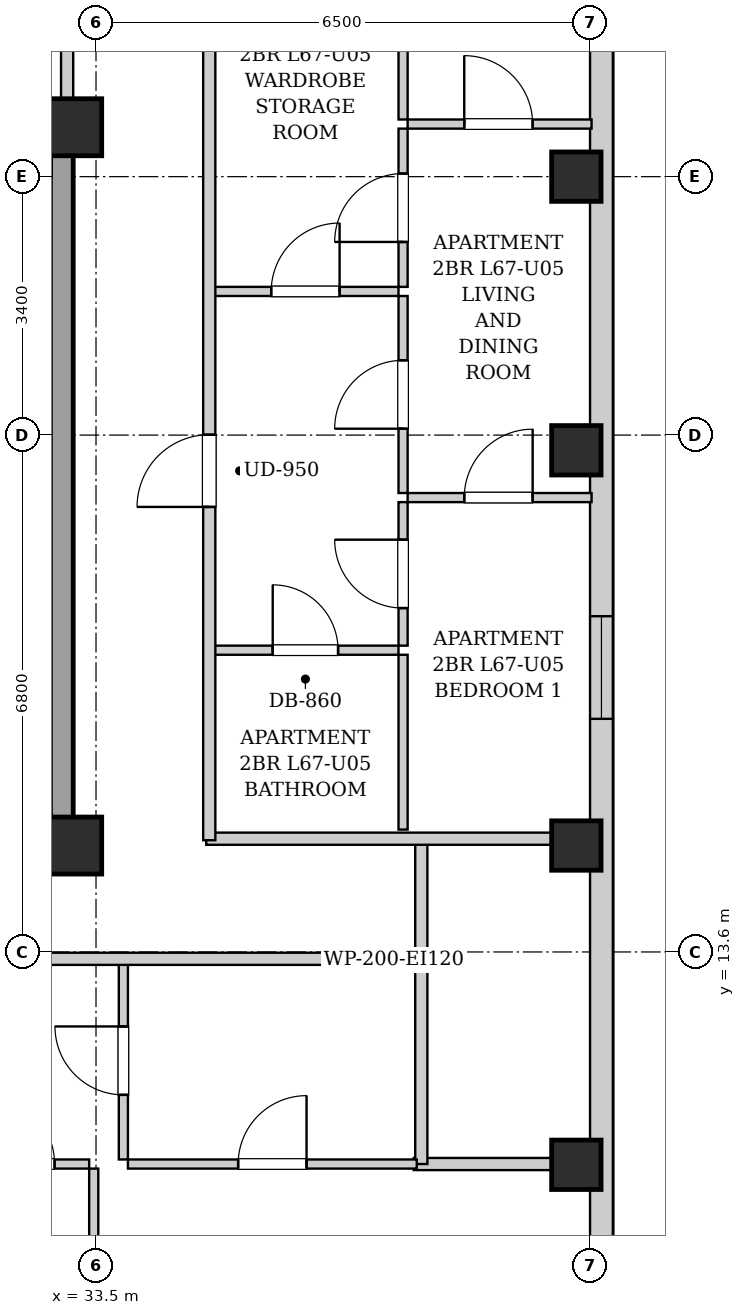
"""IFC4 building model, lengths in metres.
Left out: names, types, materials, properties, quantities, classifications, styles, units other than length and angle.
Written with IfcOpenShell. Run it as: python <this file> out.ifc"""

import sys

from ifc_helpers import new_model, si_unit, direction, frame, frame_2d, origin, origin_2d, place, context, subcontext, project, spatial, rectangle, extrude, element, fill, save


model = new_model("IFC4")
c1 = context("Model", 3, precision=1e-05, world=origin(), true_north=direction((0.0, 1.0)))
c2 = subcontext(c1, "Body", "Model", "MODEL_VIEW")
j1 = project(units=[si_unit("LENGTHUNIT", "METRE"), si_unit("PLANEANGLEUNIT", "RADIAN")], contexts=[c1])
p1 = place(None, origin())
s1 = spatial("IfcSite", under=j1, at=p1, CompositionType="ELEMENT")
p2 = place(p1, origin())
s2 = spatial("IfcBuilding", under=s1, at=p2, CompositionType="ELEMENT")
p3 = place(p2, frame((0.0, 0.0, 230.9)))
s3 = spatial("IfcBuildingStorey", under=s2, at=p3, CompositionType="ELEMENT", Elevation=230.9)
for number, where, z_axis, x_axis in (
    (1, (39.82, 10.8, 0.0), (0.0, 0.0, 1.0), (1.0, 0.0, 0.0)),
    (2, (39.82, 15.0, 0.0), (0.0, 0.0, 1.0), (1.0, 0.0, 0.0)),
    (3, (39.82, 20.2, 0.0), (0.0, 0.0, 1.0), (1.0, 0.0, 0.0)),
    (4, (39.82, 23.8, 0.0), (0.0, 0.0, 1.0), (1.0, 0.0, 0.0)),
):
    element("IfcColumn", number, at=place(p3, frame(where, z_axis=z_axis, x_axis=x_axis)), inside=s3, PredefinedType="COLUMN", context=c2, shape_type="SweptSolid", body=[
        extrude(rectangle(XDim=0.65, YDim=0.65, at=origin_2d()), origin(), (0.0, 0.0, 1.0), 3.4),
    ])
for number, where, z_axis, x_axis in (
    (5, (33.2, 15.0, 0.0), (0.0, 0.0, 1.0), (1.0, 0.0, 0.0)),
    (6, (33.2, 24.45, 0.0), (0.0, 0.0, 1.0), (1.0, 0.0, 0.0)),
):
    element("IfcColumn", number, at=place(p3, frame(where, z_axis=z_axis, x_axis=x_axis)), inside=s3, PredefinedType="COLUMN", context=c2, shape_type="SweptSolid", body=[
        extrude(rectangle(XDim=0.75, YDim=0.75, at=origin_2d()), origin(), (0.0, 0.0, 1.0), 3.4),
    ])
p4 = place(p3, frame((40.15, 37.7, 0.0), z_axis=(0.0, 0.0, 1.0), x_axis=(0.0, -1.0, 0.0)))
e7 = element("IfcWall", 7, at=p4, inside=s3, PredefinedType="SOLIDWALL", context=c2, shape_type="SweptSolid", body=[
    extrude(rectangle(XDim=31.4, YDim=0.3, at=frame_2d((15.7, 0.0))), origin(), (0.0, 0.0, 1.0), 3.14),
])
p5 = place(p4, frame((28.396, 0.0, 0.55)))
e8 = element("IfcOpeningElement", 8, at=p5, cuts=e7, PredefinedType="OPENING", context=c2, shape_type="SweptSolid", body=[
    extrude(rectangle(XDim=1.35, YDim=1.2, at=frame_2d((0.675, 0.6))), frame((0.0, 0.16, 0.0), z_axis=(0.0, -1.0, 0.0), x_axis=(1.0, 0.0, 0.0)), (0.0, 0.0, 1.0), 0.32),
])
p6 = place(p4, frame((1.653, 0.0, 0.55)))
e9 = element("IfcOpeningElement", 9, at=p6, cuts=e7, PredefinedType="OPENING", context=c2, shape_type="SweptSolid", body=[
    extrude(rectangle(XDim=1.35, YDim=1.2, at=frame_2d((0.675, 0.6))), frame((0.0, 0.16, 0.0), z_axis=(0.0, -1.0, 0.0), x_axis=(1.0, 0.0, 0.0)), (0.0, 0.0, 1.0), 0.32),
])
p7 = place(p4, frame((19.683, 0.0, 0.55)))
e10 = element("IfcOpeningElement", 10, at=p7, cuts=e7, PredefinedType="OPENING", context=c2, shape_type="SweptSolid", body=[
    extrude(rectangle(XDim=1.35, YDim=1.2, at=frame_2d((0.675, 0.6))), frame((0.0, 0.16, 0.0), z_axis=(0.0, -1.0, 0.0), x_axis=(1.0, 0.0, 0.0)), (0.0, 0.0, 1.0), 0.32),
])
p8 = place(p4, frame((10.367, 0.0, 0.55)))
e11 = element("IfcOpeningElement", 11, at=p8, cuts=e7, PredefinedType="OPENING", context=c2, shape_type="SweptSolid", body=[
    extrude(rectangle(XDim=1.35, YDim=1.2, at=frame_2d((0.675, 0.6))), frame((0.0, 0.16, 0.0), z_axis=(0.0, -1.0, 0.0), x_axis=(1.0, 0.0, 0.0)), (0.0, 0.0, 1.0), 0.32),
])
p9 = place(p3, frame((33.05, 15.1, 0.0), z_axis=(0.0, 0.0, 1.0), x_axis=(0.0, 1.0, 0.0)))
e12 = element("IfcWall", 12, at=p9, inside=s3, PredefinedType="SHEAR", context=c2, shape_type="SweptSolid", body=[
    extrude(rectangle(XDim=9.0, YDim=0.3, at=frame_2d((4.5, 0.0))), origin(), (0.0, 0.0, 1.0), 3.14),
])
p10 = place(p3, frame((33.12, 24.12, 0.0), z_axis=(0.0, 0.0, 1.0), x_axis=(0.0, 1.0, 0.0)))
e13 = element("IfcWall", 13, at=p10, inside=s3, PredefinedType="PARTITIONING", context=c2, shape_type="SweptSolid", body=[
    extrude(rectangle(XDim=4.76, YDim=0.16, at=frame_2d((2.38, 0.0))), origin(), (0.0, 0.0, 1.0), 3.14),
])
p11 = place(p3, frame((37.78, 13.51, 0.0), z_axis=(0.0, 0.0, 1.0), x_axis=(0.0, 1.0, 0.0)))
e14 = element("IfcWall", 14, at=p11, inside=s3, PredefinedType="PARTITIONING", context=c2, shape_type="SweptSolid", body=[
    extrude(rectangle(XDim=1.58, YDim=0.16, at=frame_2d((0.79, 0.0))), origin(), (0.0, 0.0, 1.0), 3.14),
])
p12 = place(p3, frame((34.95, 15.09, 0.0), z_axis=(0.0, 0.0, 1.0), x_axis=(1.0, 0.0, 0.0)))
e15 = element("IfcWall", 15, at=p12, inside=s3, PredefinedType="PARTITIONING", context=c2, shape_type="SweptSolid", body=[
    extrude(rectangle(XDim=5.07, YDim=0.16, at=frame_2d((2.535, 0.0))), origin(), (0.0, 0.0, 1.0), 2.668),
])
p13 = place(p3, frame((37.68, 10.81, 0.0), z_axis=(0.0, 0.0, 1.0), x_axis=(1.0, 0.0, 0.0)))
e16 = element("IfcWall", 16, at=p13, inside=s3, PredefinedType="PARTITIONING", context=c2, shape_type="SweptSolid", body=[
    extrude(rectangle(XDim=2.34, YDim=0.16, at=frame_2d((1.17, 0.0))), origin(), (0.0, 0.0, 1.0), 3.14),
])
p14 = place(p3, frame((37.78, 10.81, 0.0), z_axis=(0.0, 0.0, 1.0), x_axis=(0.0, 1.0, 0.0)))
e17 = element("IfcWall", 17, at=p14, inside=s3, PredefinedType="PARTITIONING", context=c2, shape_type="SweptSolid", body=[
    extrude(rectangle(XDim=2.66, YDim=0.16, at=frame_2d((1.33, 0.0))), origin(), (0.0, 0.0, 1.0), 3.14),
])
p15 = place(p3, frame((33.86, 10.87, 0.0), z_axis=(0.0, 0.0, 1.0), x_axis=(0.0, 1.0, 0.0)))
e18 = element("IfcWall", 18, at=p15, inside=s3, PredefinedType="PARTITIONING", context=c2, shape_type="SweptSolid", body=[
    extrude(rectangle(XDim=2.6, YDim=0.12, at=frame_2d((1.3, 0.0))), origin(), (0.0, 0.0, 1.0), 3.14),
])
p16 = place(p15, frame((0.85, 0.0, 0.0)))
e19 = element("IfcOpeningElement", 19, at=p16, cuts=e18, PredefinedType="OPENING", context=c2, shape_type="SweptSolid", body=[
    extrude(rectangle(XDim=0.9, YDim=2.05, at=frame_2d((0.45, 1.025))), frame((0.0, 0.07, 0.0), z_axis=(0.0, -1.0, 0.0), x_axis=(1.0, 0.0, 0.0)), (0.0, 0.0, 1.0), 0.14),
])
p17 = place(p3, frame((31.6, 10.81, 0.0), z_axis=(0.0, 0.0, 1.0), x_axis=(1.0, 0.0, 0.0)))
e20 = element("IfcWall", 20, at=p17, inside=s3, PredefinedType="PARTITIONING", context=c2, shape_type="SweptSolid", body=[
    extrude(rectangle(XDim=1.81, YDim=0.12, at=frame_2d((0.905, 0.0))), origin(), (0.0, 0.0, 1.0), 3.14),
])
p18 = place(p17, frame((0.455, 0.0, 0.0)))
e21 = element("IfcOpeningElement", 21, at=p18, cuts=e20, PredefinedType="OPENING", context=c2, shape_type="SweptSolid", body=[
    extrude(rectangle(XDim=0.9, YDim=2.05, at=frame_2d((0.45, 1.025))), frame((0.0, 0.07, 0.0), z_axis=(0.0, -1.0, 0.0), x_axis=(1.0, 0.0, 0.0)), (0.0, 0.0, 1.0), 0.14),
])
p19 = place(p3, frame((33.92, 10.81, 0.0), z_axis=(0.0, 0.0, 1.0), x_axis=(1.0, 0.0, 0.0)))
e22 = element("IfcWall", 22, at=p19, inside=s3, PredefinedType="PARTITIONING", context=c2, shape_type="SweptSolid", body=[
    extrude(rectangle(XDim=3.8, YDim=0.12, at=frame_2d((1.9, 0.0))), origin(), (0.0, 0.0, 1.0), 3.14),
])
p20 = place(p19, frame((1.45, 0.0, 0.0)))
e23 = element("IfcOpeningElement", 23, at=p20, cuts=e22, PredefinedType="OPENING", context=c2, shape_type="SweptSolid", body=[
    extrude(rectangle(XDim=0.9, YDim=2.05, at=frame_2d((0.45, 1.025))), frame((0.0, 0.07, 0.0), z_axis=(0.0, -1.0, 0.0), x_axis=(1.0, 0.0, 0.0)), (0.0, 0.0, 1.0), 0.14),
])
p21 = place(p3, frame((33.47, 6.23, 0.0), z_axis=(0.0, 0.0, 1.0), x_axis=(0.0, 1.0, 0.0)))
e24 = element("IfcWall", 24, at=p21, inside=s3, PredefinedType="PARTITIONING", context=c2, shape_type="SweptSolid", body=[
    extrude(rectangle(XDim=4.52, YDim=0.12, at=frame_2d((2.26, 0.0))), origin(), (0.0, 0.0, 1.0), 3.14),
])
p22 = place(p21, frame((1.81, 0.0, 0.0)))
e25 = element("IfcOpeningElement", 25, at=p22, cuts=e24, PredefinedType="OPENING", context=c2, shape_type="SweptSolid", body=[
    extrude(rectangle(XDim=0.9, YDim=2.05, at=frame_2d((0.45, 1.025))), frame((0.0, 0.07, 0.0), z_axis=(0.0, -1.0, 0.0), x_axis=(1.0, 0.0, 0.0)), (0.0, 0.0, 1.0), 0.14),
])
p23 = place(p3, frame((35.03, 22.29, 0.0), z_axis=(0.0, 0.0, 1.0), x_axis=(1.0, 0.0, 0.0)))
e26 = element("IfcWall", 26, at=p23, inside=s3, PredefinedType="PARTITIONING", context=c2, shape_type="SweptSolid", body=[
    extrude(rectangle(XDim=2.45, YDim=0.12, at=frame_2d((1.225, 0.0))), origin(), (0.0, 0.0, 1.0), 3.14),
])
p24 = place(p23, frame((0.775, 0.0, 0.0)))
e27 = element("IfcOpeningElement", 27, at=p24, cuts=e26, PredefinedType="OPENING", context=c2, shape_type="SweptSolid", body=[
    extrude(rectangle(XDim=0.9, YDim=2.05, at=frame_2d((0.45, 1.025))), frame((0.0, 0.07, 0.0), z_axis=(0.0, -1.0, 0.0), x_axis=(1.0, 0.0, 0.0)), (0.0, 0.0, 1.0), 0.14),
])
p25 = place(p3, frame((37.54, 22.35, 0.0), z_axis=(0.0, 0.0, 1.0), x_axis=(0.0, 1.0, 0.0)))
e28 = element("IfcWall", 28, at=p25, inside=s3, PredefinedType="PARTITIONING", context=c2, shape_type="SweptSolid", body=[
    extrude(rectangle(XDim=2.082, YDim=0.12, at=frame_2d((1.041, 0.0))), origin(), (0.0, 0.0, 1.0), 3.14),
])
p26 = place(p25, frame((0.591, 0.0, 0.0)))
e29 = element("IfcOpeningElement", 29, at=p26, cuts=e28, PredefinedType="OPENING", context=c2, shape_type="SweptSolid", body=[
    extrude(rectangle(XDim=0.9, YDim=2.05, at=frame_2d((0.45, 1.025))), frame((0.0, 0.07, 0.0), z_axis=(0.0, -1.0, 0.0), x_axis=(1.0, 0.0, 0.0)), (0.0, 0.0, 1.0), 0.14),
])
p27 = place(p3, frame((37.54, 24.552, 0.0), z_axis=(0.0, 0.0, 1.0), x_axis=(0.0, 1.0, 0.0)))
e30 = element("IfcWall", 30, at=p27, inside=s3, PredefinedType="PARTITIONING", context=c2, shape_type="SweptSolid", body=[
    extrude(rectangle(XDim=4.308, YDim=0.12, at=frame_2d((2.154, 0.0))), origin(), (0.0, 0.0, 1.0), 3.14),
])
p28 = place(p27, frame((1.704, 0.0, 0.0)))
e31 = element("IfcOpeningElement", 31, at=p28, cuts=e30, PredefinedType="OPENING", context=c2, shape_type="SweptSolid", body=[
    extrude(rectangle(XDim=0.9, YDim=2.05, at=frame_2d((0.45, 1.025))), frame((0.0, 0.07, 0.0), z_axis=(0.0, -1.0, 0.0), x_axis=(1.0, 0.0, 0.0)), (0.0, 0.0, 1.0), 0.14),
])
p29 = place(p3, frame((35.03, 17.57, 0.0), z_axis=(0.0, 0.0, 1.0), x_axis=(1.0, 0.0, 0.0)))
e32 = element("IfcWall", 32, at=p29, inside=s3, PredefinedType="PARTITIONING", context=c2, shape_type="SweptSolid", body=[
    extrude(rectangle(XDim=2.45, YDim=0.12, at=frame_2d((1.225, 0.0))), origin(), (0.0, 0.0, 1.0), 3.14),
])
p30 = place(p29, frame((0.795, 0.0, 0.0)))
e33 = element("IfcOpeningElement", 33, at=p30, cuts=e32, PredefinedType="OPENING", context=c2, shape_type="SweptSolid", body=[
    extrude(rectangle(XDim=0.86, YDim=2.05, at=frame_2d((0.43, 1.025))), frame((0.0, 0.07, 0.0), z_axis=(0.0, -1.0, 0.0), x_axis=(1.0, 0.0, 0.0)), (0.0, 0.0, 1.0), 0.14),
])
p31 = place(p3, frame((37.54, 15.21, 0.0), z_axis=(0.0, 0.0, 1.0), x_axis=(0.0, 1.0, 0.0)))
e34 = element("IfcWall", 34, at=p31, inside=s3, PredefinedType="PARTITIONING", context=c2, shape_type="SweptSolid", body=[
    extrude(rectangle(XDim=2.3, YDim=0.12, at=frame_2d((1.15, 0.0))), origin(), (0.0, 0.0, 1.0), 3.14),
])
p32 = place(p3, frame((37.54, 17.63, 0.0), z_axis=(0.0, 0.0, 1.0), x_axis=(0.0, 1.0, 0.0)))
e35 = element("IfcWall", 35, at=p32, inside=s3, PredefinedType="PARTITIONING", context=c2, shape_type="SweptSolid", body=[
    extrude(rectangle(XDim=1.888, YDim=0.12, at=frame_2d((0.944, 0.0))), origin(), (0.0, 0.0, 1.0), 3.14),
])
p33 = place(p32, frame((0.494, 0.0, 0.0)))
e36 = element("IfcOpeningElement", 36, at=p33, cuts=e35, PredefinedType="OPENING", context=c2, shape_type="SweptSolid", body=[
    extrude(rectangle(XDim=0.9, YDim=2.05, at=frame_2d((0.45, 1.025))), frame((0.0, 0.07, 0.0), z_axis=(0.0, -1.0, 0.0), x_axis=(1.0, 0.0, 0.0)), (0.0, 0.0, 1.0), 0.14),
])
p34 = place(p3, frame((37.54, 19.638, 0.0), z_axis=(0.0, 0.0, 1.0), x_axis=(0.0, 1.0, 0.0)))
e37 = element("IfcWall", 37, at=p34, inside=s3, PredefinedType="PARTITIONING", context=c2, shape_type="SweptSolid", body=[
    extrude(rectangle(XDim=2.592, YDim=0.12, at=frame_2d((1.296, 0.0))), origin(), (0.0, 0.0, 1.0), 3.14),
])
p35 = place(p34, frame((0.846, 0.0, 0.0)))
e38 = element("IfcOpeningElement", 38, at=p35, cuts=e37, PredefinedType="OPENING", context=c2, shape_type="SweptSolid", body=[
    extrude(rectangle(XDim=0.9, YDim=2.05, at=frame_2d((0.45, 1.025))), frame((0.0, 0.07, 0.0), z_axis=(0.0, -1.0, 0.0), x_axis=(1.0, 0.0, 0.0)), (0.0, 0.0, 1.0), 0.14),
])
p36 = place(p3, frame((37.6, 19.578, 0.0), z_axis=(0.0, 0.0, 1.0), x_axis=(1.0, 0.0, 0.0)))
e39 = element("IfcWall", 39, at=p36, inside=s3, PredefinedType="PARTITIONING", context=c2, shape_type="SweptSolid", body=[
    extrude(rectangle(XDim=2.42, YDim=0.12, at=frame_2d((1.21, 0.0))), origin(), (0.0, 0.0, 1.0), 3.14),
])
p37 = place(p36, frame((0.745, 0.0, 0.0)))
e40 = element("IfcOpeningElement", 40, at=p37, cuts=e39, PredefinedType="OPENING", context=c2, shape_type="SweptSolid", body=[
    extrude(rectangle(XDim=0.9, YDim=2.05, at=frame_2d((0.45, 1.025))), frame((0.0, 0.07, 0.0), z_axis=(0.0, -1.0, 0.0), x_axis=(1.0, 0.0, 0.0)), (0.0, 0.0, 1.0), 0.14),
])
p38 = place(p3, frame((37.6, 24.492, 0.0), z_axis=(0.0, 0.0, 1.0), x_axis=(1.0, 0.0, 0.0)))
e41 = element("IfcWall", 41, at=p38, inside=s3, PredefinedType="PARTITIONING", context=c2, shape_type="SweptSolid", body=[
    extrude(rectangle(XDim=2.42, YDim=0.12, at=frame_2d((1.21, 0.0))), origin(), (0.0, 0.0, 1.0), 2.878),
])
p39 = place(p38, frame((0.745, 0.0, 0.0)))
e42 = element("IfcOpeningElement", 42, at=p39, cuts=e41, PredefinedType="OPENING", context=c2, shape_type="SweptSolid", body=[
    extrude(rectangle(XDim=0.9, YDim=2.05, at=frame_2d((0.45, 1.025))), frame((0.0, 0.07, 0.0), z_axis=(0.0, -1.0, 0.0), x_axis=(1.0, 0.0, 0.0)), (0.0, 0.0, 1.0), 0.14),
])
p40 = place(p3, frame((13.15, 13.51, 0.0), z_axis=(0.0, 0.0, 1.0), x_axis=(1.0, 0.0, 0.0)))
e43 = element("IfcWall", 43, at=p40, inside=s3, PredefinedType="PARTITIONING", context=c2, shape_type="SweptSolid", body=[
    extrude(rectangle(XDim=24.6, YDim=0.16, at=frame_2d((12.3, 0.0))), origin(), (0.0, 0.0, 1.0), 3.14),
])
p41 = place(p40, frame((3.165, 0.0, 0.0)))
e44 = element("IfcOpeningElement", 44, at=p41, cuts=e43, PredefinedType="OPENING", context=c2, shape_type="SweptSolid", body=[
    extrude(rectangle(XDim=0.95, YDim=2.1, at=frame_2d((0.475, 1.05))), frame((0.0, 0.09, 0.0), z_axis=(0.0, -1.0, 0.0), x_axis=(1.0, 0.0, 0.0)), (0.0, 0.0, 1.0), 0.18),
])
p42 = place(p3, frame((34.99, 15.07, 0.0), z_axis=(0.0, 0.0, 1.0), x_axis=(0.0, 1.0, 0.0)))
e45 = element("IfcWall", 45, at=p42, inside=s3, PredefinedType="PARTITIONING", context=c2, shape_type="SweptSolid", body=[
    extrude(rectangle(XDim=13.93, YDim=0.16, at=frame_2d((6.965, 0.0))), origin(), (0.0, 0.0, 1.0), 3.14),
])
p43 = place(p42, frame((4.385, 0.0, 0.0)))
e46 = element("IfcOpeningElement", 46, at=p43, cuts=e45, PredefinedType="OPENING", context=c2, shape_type="SweptSolid", body=[
    extrude(rectangle(XDim=0.95, YDim=2.1, at=frame_2d((0.475, 1.05))), frame((0.0, 0.09, 0.0), z_axis=(0.0, -1.0, 0.0), x_axis=(1.0, 0.0, 0.0)), (0.0, 0.0, 1.0), 0.18),
])
p44 = place(p16, origin())
e47 = element("IfcDoor", 47, at=p44, inside=s3, OperationType="SINGLE_SWING_RIGHT", PredefinedType="DOOR", context=c2, shape_type="SweptSolid", body=[
    extrude(rectangle(XDim=0.9, YDim=2.05, at=frame_2d((0.45, 1.025))), frame((0.0, 0.025, 0.0), z_axis=(0.0, -1.0, 0.0), x_axis=(1.0, 0.0, 0.0)), (0.0, 0.0, 1.0), 0.05),
])
fill(e19, e47)
p45 = place(p18, origin())
e48 = element("IfcDoor", 48, at=p45, inside=s3, OperationType="SINGLE_SWING_LEFT", PredefinedType="DOOR", context=c2, shape_type="SweptSolid", body=[
    extrude(rectangle(XDim=0.9, YDim=2.05, at=frame_2d((0.45, 1.025))), frame((0.0, 0.025, 0.0), z_axis=(0.0, -1.0, 0.0), x_axis=(1.0, 0.0, 0.0)), (0.0, 0.0, 1.0), 0.05),
])
fill(e21, e48)
p46 = place(p20, origin())
e49 = element("IfcDoor", 49, at=p46, inside=s3, OperationType="SINGLE_SWING_RIGHT", PredefinedType="DOOR", context=c2, shape_type="SweptSolid", body=[
    extrude(rectangle(XDim=0.9, YDim=2.05, at=frame_2d((0.45, 1.025))), frame((0.0, 0.025, 0.0), z_axis=(0.0, -1.0, 0.0), x_axis=(1.0, 0.0, 0.0)), (0.0, 0.0, 1.0), 0.05),
])
fill(e23, e49)
p47 = place(p24, origin())
e50 = element("IfcDoor", 50, at=p47, inside=s3, OperationType="SINGLE_SWING_RIGHT", PredefinedType="DOOR", context=c2, shape_type="SweptSolid", body=[
    extrude(rectangle(XDim=0.9, YDim=2.05, at=frame_2d((0.45, 1.025))), frame((0.0, 0.025, 0.0), z_axis=(0.0, -1.0, 0.0), x_axis=(1.0, 0.0, 0.0)), (0.0, 0.0, 1.0), 0.05),
])
fill(e27, e50)
p48 = place(p26, origin())
e51 = element("IfcDoor", 51, at=p48, inside=s3, OperationType="SINGLE_SWING_LEFT", PredefinedType="DOOR", context=c2, shape_type="SweptSolid", body=[
    extrude(rectangle(XDim=0.9, YDim=2.05, at=frame_2d((0.45, 1.025))), frame((0.0, 0.025, 0.0), z_axis=(0.0, -1.0, 0.0), x_axis=(1.0, 0.0, 0.0)), (0.0, 0.0, 1.0), 0.05),
])
fill(e29, e51)
p49 = place(p30, origin())
e52 = element("IfcDoor", 52, at=p49, inside=s3, OperationType="SINGLE_SWING_LEFT", PredefinedType="DOOR", context=c2, shape_type="SweptSolid", body=[
    extrude(rectangle(XDim=0.86, YDim=2.05, at=frame_2d((0.43, 1.025))), frame((0.0, 0.025, 0.0), z_axis=(0.0, -1.0, 0.0), x_axis=(1.0, 0.0, 0.0)), (0.0, 0.0, 1.0), 0.05),
])
fill(e33, e52)
p50 = place(p33, origin())
e53 = element("IfcDoor", 53, at=p50, inside=s3, OperationType="SINGLE_SWING_RIGHT", PredefinedType="DOOR", context=c2, shape_type="SweptSolid", body=[
    extrude(rectangle(XDim=0.9, YDim=2.05, at=frame_2d((0.45, 1.025))), frame((0.0, 0.025, 0.0), z_axis=(0.0, -1.0, 0.0), x_axis=(1.0, 0.0, 0.0)), (0.0, 0.0, 1.0), 0.05),
])
fill(e36, e53)
p51 = place(p35, origin())
e54 = element("IfcDoor", 54, at=p51, inside=s3, OperationType="SINGLE_SWING_LEFT", PredefinedType="DOOR", context=c2, shape_type="SweptSolid", body=[
    extrude(rectangle(XDim=0.9, YDim=2.05, at=frame_2d((0.45, 1.025))), frame((0.0, 0.025, 0.0), z_axis=(0.0, -1.0, 0.0), x_axis=(1.0, 0.0, 0.0)), (0.0, 0.0, 1.0), 0.05),
])
fill(e38, e54)
p52 = place(p37, origin())
e55 = element("IfcDoor", 55, at=p52, inside=s3, OperationType="SINGLE_SWING_RIGHT", PredefinedType="DOOR", context=c2, shape_type="SweptSolid", body=[
    extrude(rectangle(XDim=0.9, YDim=2.05, at=frame_2d((0.45, 1.025))), frame((0.0, 0.025, 0.0), z_axis=(0.0, -1.0, 0.0), x_axis=(1.0, 0.0, 0.0)), (0.0, 0.0, 1.0), 0.05),
])
fill(e40, e55)
p53 = place(p39, origin())
e56 = element("IfcDoor", 56, at=p53, inside=s3, OperationType="SINGLE_SWING_LEFT", PredefinedType="DOOR", context=c2, shape_type="SweptSolid", body=[
    extrude(rectangle(XDim=0.9, YDim=2.05, at=frame_2d((0.45, 1.025))), frame((0.0, 0.025, 0.0), z_axis=(0.0, -1.0, 0.0), x_axis=(1.0, 0.0, 0.0)), (0.0, 0.0, 1.0), 0.05),
])
fill(e42, e56)
p54 = place(p43, origin())
e57 = element("IfcDoor", 57, at=p54, inside=s3, OperationType="SINGLE_SWING_LEFT", PredefinedType="DOOR", context=c2, shape_type="SweptSolid", body=[
    extrude(rectangle(XDim=0.95, YDim=2.1, at=frame_2d((0.475, 1.05))), frame((0.0, 0.025, 0.0), z_axis=(0.0, -1.0, 0.0), x_axis=(1.0, 0.0, 0.0)), (0.0, 0.0, 1.0), 0.05),
])
fill(e46, e57)
p55 = place(p7, origin())
e58 = element("IfcWindow", 58, at=p55, inside=s3, PartitioningType="SINGLE_PANEL", PredefinedType="WINDOW", context=c2, shape_type="SweptSolid", body=[
    extrude(rectangle(XDim=1.35, YDim=1.2, at=frame_2d((0.675, 0.6))), frame((0.0, 0.03, 0.0), z_axis=(0.0, -1.0, 0.0), x_axis=(1.0, 0.0, 0.0)), (0.0, 0.0, 1.0), 0.06),
])
fill(e10, e58)
save(model, sys.argv[1])
